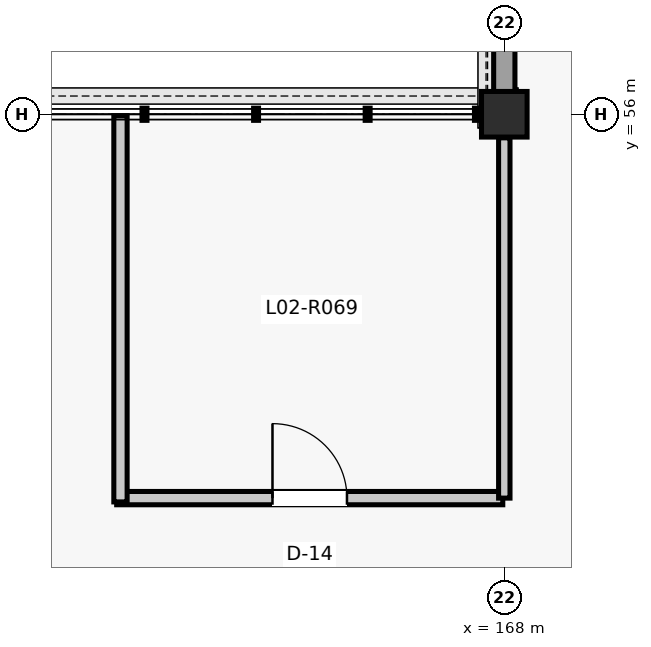
"""IFC4 building model, lengths in metres.
Left out: names, types, materials, properties, quantities, classifications, styles, units other than length and angle.
Written with IfcOpenShell. Run it as: python <this file> out.ifc"""

import sys

from ifc_helpers import new_model, si_unit, direction, frame, frame_2d, origin, origin_2d, place, context, subcontext, project, spatial, rectangle, extrude, element, fill, save


model = new_model("IFC4")
c1 = context("Model", 3, precision=1e-05, world=origin(), true_north=direction((0.0, 1.0)))
c2 = subcontext(c1, "Body", "Model", "MODEL_VIEW")
j1 = project(units=[si_unit("LENGTHUNIT", "METRE"), si_unit("PLANEANGLEUNIT", "RADIAN")], contexts=[c1])
p1 = place(None, origin())
s1 = spatial("IfcSite", under=j1, at=p1, CompositionType="ELEMENT")
p2 = place(p1, origin())
s2 = spatial("IfcBuilding", under=s1, at=p2, CompositionType="ELEMENT")
p3 = place(p2, frame((0.0, 0.0, 9.9)))
s3 = spatial("IfcBuildingStorey", under=s2, at=p3, CompositionType="ELEMENT", Elevation=9.9)
p4 = place(p3, frame((168.0, 56.0, 0.0), z_axis=(0.0, 0.0, 1.0), x_axis=(1.0, 0.0, 0.0)))
e1 = element("IfcColumn", 1, at=p4, inside=s3, PredefinedType="COLUMN", context=c2, shape_type="SweptSolid", body=[
    extrude(rectangle(XDim=0.6, YDim=0.6, at=origin_2d()), origin(), (0.0, 0.0, 1.0), 3.96),
])
p5 = place(p3, frame((168.0, 56.285, 0.0), z_axis=(0.0, 0.0, 1.0), x_axis=(0.0, 1.0, 0.0)))
e2 = element("IfcWall", 2, at=p5, inside=s3, PredefinedType="SOLIDWALL", context=c2, shape_type="SweptSolid", body=[
    extrude(rectangle(XDim=7.43, YDim=0.28, at=frame_2d((3.715, 0.0))), origin(), (0.0, 0.0, 1.0), 3.284),
])
p6 = place(p5, frame((2.965, 0.0, 0.9)))
e3 = element("IfcOpeningElement", 3, at=p6, cuts=e2, PredefinedType="OPENING", context=c2, shape_type="SweptSolid", body=[
    extrude(rectangle(XDim=1.5, YDim=1.9, at=frame_2d((0.75, 0.95))), frame((0.0, 0.15, 0.0), z_axis=(0.0, -1.0, 0.0), x_axis=(1.0, 0.0, 0.0)), (0.0, 0.0, 1.0), 0.3),
])
p7 = place(p3, frame((162.9, 50.95, 0.0), z_axis=(0.0, 0.0, 1.0), x_axis=(1.0, 0.0, 0.0)))
e4 = element("IfcWall", 4, at=p7, inside=s3, PredefinedType="PARTITIONING", context=c2, shape_type="SweptSolid", body=[
    extrude(rectangle(XDim=5.08, YDim=0.175, at=frame_2d((2.54, 0.0))), origin(), (0.0, 0.0, 1.0), 3.221),
])
p8 = place(p7, frame((2.05, 0.0, 0.0)))
e5 = element("IfcOpeningElement", 5, at=p8, cuts=e4, PredefinedType="OPENING", context=c2, shape_type="SweptSolid", body=[
    extrude(rectangle(XDim=0.98, YDim=2.15, at=frame_2d((0.49, 1.075))), frame((0.0, 0.097, 0.0), z_axis=(0.0, -1.0, 0.0), x_axis=(1.0, 0.0, 0.0)), (0.0, 0.0, 1.0), 0.195),
])
p9 = place(p3, frame((162.95, 50.9, 0.0), z_axis=(0.0, 0.0, 1.0), x_axis=(0.0, 1.0, 0.0)))
e6 = element("IfcWall", 6, at=p9, inside=s3, PredefinedType="PARTITIONING", context=c2, shape_type="SweptSolid", body=[
    extrude(rectangle(XDim=5.08, YDim=0.175, at=frame_2d((2.54, 0.0))), origin(), (0.0, 0.0, 1.0), 3.337),
])
p10 = place(p3, frame((168.0, 50.95, 0.0), z_axis=(0.0, 0.0, 1.0), x_axis=(0.0, 1.0, 0.0)))
e7 = element("IfcWall", 7, at=p10, inside=s3, PredefinedType="PARTITIONING", context=c2, shape_type="SweptSolid", body=[
    extrude(rectangle(XDim=4.74, YDim=0.15, at=frame_2d((2.37, 0.0))), origin(), (0.0, 0.0, 1.0), 3.221),
])
p11 = place(p8, origin())
e8 = element("IfcDoor", 8, at=p11, inside=s3, OperationType="SINGLE_SWING_LEFT", PredefinedType="DOOR", context=c2, shape_type="SweptSolid", body=[
    extrude(rectangle(XDim=0.98, YDim=2.15, at=frame_2d((0.49, 1.075))), frame((0.0, 0.025, 0.0), z_axis=(0.0, -1.0, 0.0), x_axis=(1.0, 0.0, 0.0)), (0.0, 0.0, 1.0), 0.05),
])
fill(e5, e8)
save(model, sys.argv[1])
